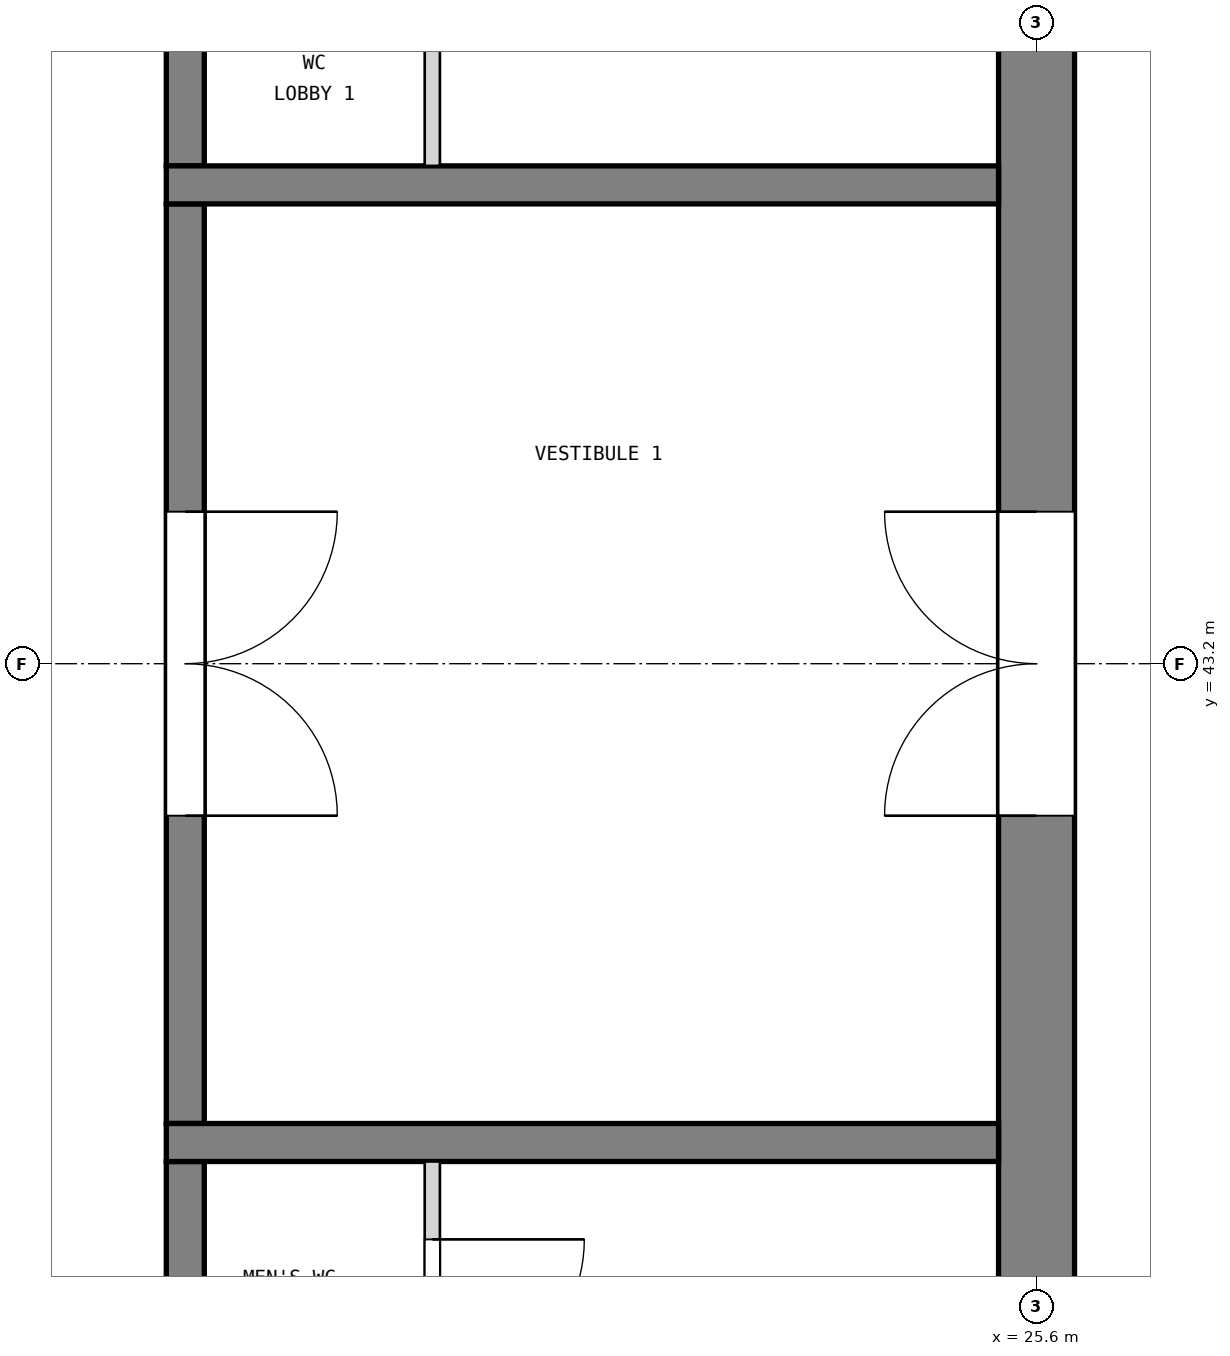
"""IFC4 building model, lengths in metres.
Left out: names, types, materials, properties, quantities, classifications, styles, units other than length and angle.
Written with IfcOpenShell. Run it as: python <this file> out.ifc"""

import sys

from ifc_helpers import new_model, si_unit, direction, frame, frame_2d, origin, place, context, subcontext, project, spatial, rectangle, extrude, element, fill, save


model = new_model("IFC4")
c1 = context("Model", 3, precision=1e-05, world=origin(), true_north=direction((0.0, 1.0)))
c2 = subcontext(c1, "Body", "Model", "MODEL_VIEW")
j1 = project(units=[si_unit("LENGTHUNIT", "METRE"), si_unit("PLANEANGLEUNIT", "RADIAN")], contexts=[c1])
p1 = place(None, origin())
s1 = spatial("IfcSite", under=j1, at=p1, CompositionType="ELEMENT")
p2 = place(p1, origin())
s2 = spatial("IfcBuilding", under=s1, at=p2, CompositionType="ELEMENT")
p3 = place(p2, frame((0.0, 0.0, 48.3)))
s3 = spatial("IfcBuildingStorey", under=s2, at=p3, CompositionType="ELEMENT", Elevation=48.3)
p4 = place(p3, frame((25.6, 33.85, 0.0), z_axis=(0.0, 0.0, 1.0), x_axis=(0.0, 1.0, 0.0)))
e1 = element("IfcWall", 1, at=p4, inside=s3, PredefinedType="SHEAR", context=c2, shape_type="SweptSolid", body=[
    extrude(rectangle(XDim=18.7, YDim=0.5, at=frame_2d((9.35, 0.0))), origin(), (0.0, 0.0, 1.0), 3.9),
])
p5 = place(p4, frame((8.35, 0.0, 0.0)))
e2 = element("IfcOpeningElement", 2, at=p5, cuts=e1, PredefinedType="OPENING", context=c2, shape_type="SweptSolid", body=[
    extrude(rectangle(XDim=2.0, YDim=2.1, at=frame_2d((1.0, 1.05))), frame((0.0, 0.26, 0.0), z_axis=(0.0, -1.0, 0.0), x_axis=(1.0, 0.0, 0.0)), (0.0, 0.0, 1.0), 0.52),
])
p6 = place(p3, frame((20.0, 33.85, 0.0), z_axis=(0.0, 0.0, 1.0), x_axis=(0.0, 1.0, 0.0)))
e3 = element("IfcWall", 3, at=p6, inside=s3, PredefinedType="SOLIDWALL", context=c2, shape_type="SweptSolid", body=[
    extrude(rectangle(XDim=6.075, YDim=0.25, at=frame_2d((3.038, 0.0))), origin(), (0.0, 0.0, 1.0), 3.6),
])
p7 = place(p6, frame((0.425, 0.0, 0.0)))
e4 = element("IfcOpeningElement", 4, at=p7, cuts=e3, PredefinedType="OPENING", context=c2, shape_type="SweptSolid", body=[
    extrude(rectangle(XDim=0.8, YDim=2.1, at=frame_2d((0.4, 1.05))), frame((0.0, 0.135, 0.0), z_axis=(0.0, -1.0, 0.0), x_axis=(1.0, 0.0, 0.0)), (0.0, 0.0, 1.0), 0.27),
])
p8 = place(p6, frame((3.413, 0.0, 0.0)))
e5 = element("IfcOpeningElement", 5, at=p8, cuts=e3, PredefinedType="OPENING", context=c2, shape_type="SweptSolid", body=[
    extrude(rectangle(XDim=1.0, YDim=2.1, at=frame_2d((0.5, 1.05))), frame((0.0, 0.135, 0.0), z_axis=(0.0, -1.0, 0.0), x_axis=(1.0, 0.0, 0.0)), (0.0, 0.0, 1.0), 0.27),
])
p9 = place(p3, frame((20.0, 40.175, 0.0), z_axis=(0.0, 0.0, 1.0), x_axis=(0.0, 1.0, 0.0)))
e6 = element("IfcWall", 6, at=p9, inside=s3, PredefinedType="SOLIDWALL", context=c2, shape_type="SweptSolid", body=[
    extrude(rectangle(XDim=6.05, YDim=0.25, at=frame_2d((3.025, 0.0))), origin(), (0.0, 0.0, 1.0), 3.6),
])
p10 = place(p9, frame((2.025, 0.0, 0.0)))
e7 = element("IfcOpeningElement", 7, at=p10, cuts=e6, PredefinedType="OPENING", context=c2, shape_type="SweptSolid", body=[
    extrude(rectangle(XDim=2.0, YDim=2.1, at=frame_2d((1.0, 1.05))), frame((0.0, 0.135, 0.0), z_axis=(0.0, -1.0, 0.0), x_axis=(1.0, 0.0, 0.0)), (0.0, 0.0, 1.0), 0.27),
])
p11 = place(p3, frame((20.0, 46.475, 0.0), z_axis=(0.0, 0.0, 1.0), x_axis=(0.0, 1.0, 0.0)))
e8 = element("IfcWall", 8, at=p11, inside=s3, PredefinedType="SOLIDWALL", context=c2, shape_type="SweptSolid", body=[
    extrude(rectangle(XDim=6.075, YDim=0.25, at=frame_2d((3.038, 0.0))), origin(), (0.0, 0.0, 1.0), 3.6),
])
p12 = place(p11, frame((1.312, 0.0, 0.0)))
e9 = element("IfcOpeningElement", 9, at=p12, cuts=e8, PredefinedType="OPENING", context=c2, shape_type="SweptSolid", body=[
    extrude(rectangle(XDim=1.0, YDim=2.1, at=frame_2d((0.5, 1.05))), frame((0.0, 0.135, 0.0), z_axis=(0.0, -1.0, 0.0), x_axis=(1.0, 0.0, 0.0)), (0.0, 0.0, 1.0), 0.27),
])
p13 = place(p11, frame((4.45, 0.0, 0.0)))
e10 = element("IfcOpeningElement", 10, at=p13, cuts=e8, PredefinedType="OPENING", context=c2, shape_type="SweptSolid", body=[
    extrude(rectangle(XDim=0.9, YDim=2.1, at=frame_2d((0.45, 1.05))), frame((0.0, 0.135, 0.0), z_axis=(0.0, -1.0, 0.0), x_axis=(1.0, 0.0, 0.0)), (0.0, 0.0, 1.0), 0.27),
])
for number, where, z_axis, x_axis in (
    (11, (19.875, 40.05, 0.0), (0.0, 0.0, 1.0), (1.0, 0.0, 0.0)),
    (12, (19.875, 46.35, 0.0), (0.0, 0.0, 1.0), (1.0, 0.0, 0.0)),
):
    element("IfcWall", number, at=place(p3, frame(where, z_axis=z_axis, x_axis=x_axis)), inside=s3, PredefinedType="SOLIDWALL", context=c2, shape_type="SweptSolid", body=[
        extrude(rectangle(XDim=5.475, YDim=0.25, at=frame_2d((2.738, 0.0))), origin(), (0.0, 0.0, 1.0), 3.6),
    ])
p14 = place(p3, frame((21.625, 35.6, 0.0), z_axis=(0.0, 0.0, 1.0), x_axis=(0.0, 1.0, 0.0)))
e13 = element("IfcWall", 13, at=p14, inside=s3, PredefinedType="PARTITIONING", context=c2, shape_type="SweptSolid", body=[
    extrude(rectangle(XDim=4.325, YDim=0.1, at=frame_2d((2.163, 0.0))), origin(), (0.0, 0.0, 1.0), 3.6),
])
p15 = place(p14, frame((0.45, 0.0, 0.0)))
e14 = element("IfcOpeningElement", 14, at=p15, cuts=e13, PredefinedType="OPENING", context=c2, shape_type="SweptSolid", body=[
    extrude(rectangle(XDim=0.9, YDim=2.1, at=frame_2d((0.45, 1.05))), frame((0.0, 0.06, 0.0), z_axis=(0.0, -1.0, 0.0), x_axis=(1.0, 0.0, 0.0)), (0.0, 0.0, 1.0), 0.12),
])
p16 = place(p14, frame((2.812, 0.0, 0.0)))
e15 = element("IfcOpeningElement", 15, at=p16, cuts=e13, PredefinedType="OPENING", context=c2, shape_type="SweptSolid", body=[
    extrude(rectangle(XDim=1.0, YDim=2.1, at=frame_2d((0.5, 1.05))), frame((0.0, 0.06, 0.0), z_axis=(0.0, -1.0, 0.0), x_axis=(1.0, 0.0, 0.0)), (0.0, 0.0, 1.0), 0.12),
])
p17 = place(p3, frame((21.625, 46.475, 0.0), z_axis=(0.0, 0.0, 1.0), x_axis=(0.0, 1.0, 0.0)))
e16 = element("IfcWall", 16, at=p17, inside=s3, PredefinedType="PARTITIONING", context=c2, shape_type="SweptSolid", body=[
    extrude(rectangle(XDim=3.625, YDim=0.1, at=frame_2d((1.812, 0.0))), origin(), (0.0, 0.0, 1.0), 3.6),
])
p18 = place(p17, frame((1.363, 0.0, 0.0)))
e17 = element("IfcOpeningElement", 17, at=p18, cuts=e16, PredefinedType="OPENING", context=c2, shape_type="SweptSolid", body=[
    extrude(rectangle(XDim=0.9, YDim=2.1, at=frame_2d((0.45, 1.05))), frame((0.0, 0.06, 0.0), z_axis=(0.0, -1.0, 0.0), x_axis=(1.0, 0.0, 0.0)), (0.0, 0.0, 1.0), 0.12),
])
p19 = place(p10, frame((2.0, 0.0, 0.0), z_axis=(0.0, 0.0, 1.0), x_axis=(-1.0, 0.0, 0.0)))
e18 = element("IfcDoor", 18, at=p19, inside=s3, OperationType="DOUBLE_DOOR_SINGLE_SWING", PredefinedType="DOOR", context=c2, shape_type="SweptSolid", body=[
    extrude(rectangle(XDim=2.0, YDim=2.1, at=frame_2d((1.0, 1.05))), frame((0.0, 0.025, 0.0), z_axis=(0.0, -1.0, 0.0), x_axis=(1.0, 0.0, 0.0)), (0.0, 0.0, 1.0), 0.05),
])
fill(e7, e18)
p20 = place(p5, origin())
e19 = element("IfcDoor", 19, at=p20, inside=s3, OperationType="DOUBLE_DOOR_SINGLE_SWING", PredefinedType="DOOR", context=c2, shape_type="SweptSolid", body=[
    extrude(rectangle(XDim=2.0, YDim=2.1, at=frame_2d((1.0, 1.05))), frame((0.0, 0.025, 0.0), z_axis=(0.0, -1.0, 0.0), x_axis=(1.0, 0.0, 0.0)), (0.0, 0.0, 1.0), 0.05),
])
fill(e2, e19)
p21 = place(p16, frame((1.0, 0.0, 0.0), z_axis=(0.0, 0.0, 1.0), x_axis=(-1.0, 0.0, 0.0)))
e20 = element("IfcDoor", 20, at=p21, inside=s3, OperationType="SINGLE_SWING_LEFT", PredefinedType="DOOR", context=c2, shape_type="SweptSolid", body=[
    extrude(rectangle(XDim=1.0, YDim=2.1, at=frame_2d((0.5, 1.05))), frame((0.0, 0.025, 0.0), z_axis=(0.0, -1.0, 0.0), x_axis=(1.0, 0.0, 0.0)), (0.0, 0.0, 1.0), 0.05),
])
fill(e15, e20)
save(model, sys.argv[1])
